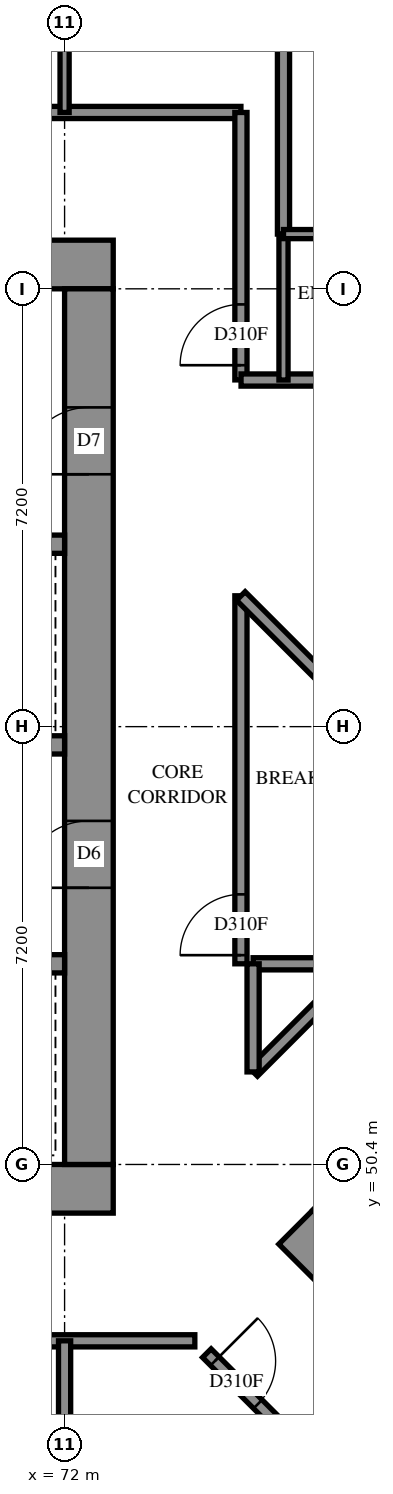
"""IFC4 building model, lengths in metres.
Left out: names, types, materials, properties, quantities, classifications, styles, units other than length and angle.
Written with IfcOpenShell. Run it as: python <this file> out.ifc"""

import sys

from ifc_helpers import new_model, si_unit, direction, frame, frame_2d, origin, place, context, subcontext, project, spatial, rectangle, extrude, element, fill, save


model = new_model("IFC4")
c1 = context("Model", 3, precision=1e-05, world=origin(), true_north=direction((0.0, 1.0)))
c2 = subcontext(c1, "Body", "Model", "MODEL_VIEW")
j1 = project(units=[si_unit("LENGTHUNIT", "METRE"), si_unit("PLANEANGLEUNIT", "RADIAN")], contexts=[c1])
p1 = place(None, origin())
s1 = spatial("IfcSite", under=j1, at=p1, CompositionType="ELEMENT")
p2 = place(p1, origin())
s2 = spatial("IfcBuilding", under=s1, at=p2, CompositionType="ELEMENT")
p3 = place(p2, frame((0.0, 0.0, 94.8)))
s3 = spatial("IfcBuildingStorey", under=s2, at=p3, CompositionType="ELEMENT", Elevation=94.8)
p4 = place(p3, frame((56.8, 50.0, -0.3), z_axis=(0.0, 0.0, 1.0), x_axis=(1.0, 0.0, 0.0)))
e1 = element("IfcWall", 1, at=p4, inside=s3, PredefinedType="SHEAR", context=c2, shape_type="SweptSolid", body=[
    extrude(rectangle(XDim=16.0, YDim=0.8, at=frame_2d((8.0, 0.0))), origin(), (0.0, 0.0, 1.0), 2.7),
])
p5 = place(p3, frame((56.8, 65.2, -0.3), z_axis=(0.0, 0.0, 1.0), x_axis=(1.0, 0.0, 0.0)))
e2 = element("IfcWall", 2, at=p5, inside=s3, PredefinedType="SHEAR", context=c2, shape_type="SweptSolid", body=[
    extrude(rectangle(XDim=16.0, YDim=0.8, at=frame_2d((8.0, 0.0))), origin(), (0.0, 0.0, 1.0), 2.7),
])
p6 = place(p5, frame((10.8, 0.0, 0.3)))
e3 = element("IfcOpeningElement", 3, at=p6, cuts=e2, PredefinedType="OPENING", context=c2, shape_type="SweptSolid", body=[
    extrude(rectangle(XDim=0.8, YDim=2.1, at=frame_2d((0.4, 1.05))), frame((0.0, 0.41, 0.0), z_axis=(0.0, -1.0, 0.0), x_axis=(1.0, 0.0, 0.0)), (0.0, 0.0, 1.0), 0.82),
])
p7 = place(p3, frame((72.4, 50.4, -0.3), z_axis=(0.0, 0.0, 1.0), x_axis=(0.0, 1.0, 0.0)))
e4 = element("IfcWall", 4, at=p7, inside=s3, PredefinedType="SHEAR", context=c2, shape_type="SweptSolid", body=[
    extrude(rectangle(XDim=14.4, YDim=0.8, at=frame_2d((7.2, 0.0))), origin(), (0.0, 0.0, 1.0), 2.7),
])
p8 = place(p7, frame((4.55, 0.0, 0.3)))
e5 = element("IfcOpeningElement", 5, at=p8, cuts=e4, PredefinedType="OPENING", context=c2, shape_type="SweptSolid", body=[
    extrude(rectangle(XDim=1.1, YDim=2.1, at=frame_2d((0.55, 1.05))), frame((0.0, 0.41, 0.0), z_axis=(0.0, -1.0, 0.0), x_axis=(1.0, 0.0, 0.0)), (0.0, 0.0, 1.0), 0.82),
])
p9 = place(p7, frame((11.35, 0.0, 0.3)))
e6 = element("IfcOpeningElement", 6, at=p9, cuts=e4, PredefinedType="OPENING", context=c2, shape_type="SweptSolid", body=[
    extrude(rectangle(XDim=1.1, YDim=2.1, at=frame_2d((0.55, 1.05))), frame((0.0, 0.41, 0.0), z_axis=(0.0, -1.0, 0.0), x_axis=(1.0, 0.0, 0.0)), (0.0, 0.0, 1.0), 0.82),
])
p10 = place(p3, frame((57.6, 53.7, 0.0), z_axis=(0.0, 0.0, 1.0), x_axis=(1.0, 0.0, 0.0)))
e7 = element("IfcWall", 7, at=p10, inside=s3, PredefinedType="SOLIDWALL", context=c2, shape_type="SweptSolid", body=[
    extrude(rectangle(XDim=14.4, YDim=0.3, at=frame_2d((7.2, 0.0))), origin(), (0.0, 0.0, 1.0), 3.1),
])
p11 = place(p10, frame((1.25, 0.0, 0.0)))
e8 = element("IfcOpeningElement", 8, at=p11, cuts=e7, PredefinedType="OPENING", context=c2, shape_type="SweptSolid", body=[
    extrude(rectangle(XDim=1.1, YDim=2.1, at=frame_2d((0.55, 1.05))), frame((0.0, 0.16, 0.0), z_axis=(0.0, -1.0, 0.0), x_axis=(1.0, 0.0, 0.0)), (0.0, 0.0, 1.0), 0.32),
])
p12 = place(p10, frame((4.85, 0.0, 0.0)))
e9 = element("IfcOpeningElement", 9, at=p12, cuts=e7, PredefinedType="OPENING", context=c2, shape_type="SweptSolid", body=[
    extrude(rectangle(XDim=1.1, YDim=2.1, at=frame_2d((0.55, 1.05))), frame((0.0, 0.16, 0.0), z_axis=(0.0, -1.0, 0.0), x_axis=(1.0, 0.0, 0.0)), (0.0, 0.0, 1.0), 0.32),
])
p13 = place(p10, frame((8.45, 0.0, 0.0)))
e10 = element("IfcOpeningElement", 10, at=p13, cuts=e7, PredefinedType="OPENING", context=c2, shape_type="SweptSolid", body=[
    extrude(rectangle(XDim=1.1, YDim=2.1, at=frame_2d((0.55, 1.05))), frame((0.0, 0.16, 0.0), z_axis=(0.0, -1.0, 0.0), x_axis=(1.0, 0.0, 0.0)), (0.0, 0.0, 1.0), 0.32),
])
p14 = place(p10, frame((12.05, 0.0, 0.0)))
e11 = element("IfcOpeningElement", 11, at=p14, cuts=e7, PredefinedType="OPENING", context=c2, shape_type="SweptSolid", body=[
    extrude(rectangle(XDim=1.1, YDim=2.1, at=frame_2d((0.55, 1.05))), frame((0.0, 0.16, 0.0), z_axis=(0.0, -1.0, 0.0), x_axis=(1.0, 0.0, 0.0)), (0.0, 0.0, 1.0), 0.32),
])
p15 = place(p3, frame((57.6, 57.3, 0.0), z_axis=(0.0, 0.0, 1.0), x_axis=(1.0, 0.0, 0.0)))
e12 = element("IfcWall", 12, at=p15, inside=s3, PredefinedType="SOLIDWALL", context=c2, shape_type="SweptSolid", body=[
    extrude(rectangle(XDim=14.4, YDim=0.3, at=frame_2d((7.2, 0.0))), origin(), (0.0, 0.0, 1.0), 3.1),
])
p16 = place(p15, frame((12.05, 0.0, 0.0)))
e13 = element("IfcOpeningElement", 13, at=p16, cuts=e12, PredefinedType="OPENING", context=c2, shape_type="SweptSolid", body=[
    extrude(rectangle(XDim=1.1, YDim=2.1, at=frame_2d((0.55, 1.05))), frame((0.0, 0.16, 0.0), z_axis=(0.0, -1.0, 0.0), x_axis=(1.0, 0.0, 0.0)), (0.0, 0.0, 1.0), 0.32),
])
p17 = place(p3, frame((64.8, 60.6, 0.0), z_axis=(0.0, 0.0, 1.0), x_axis=(1.0, 0.0, 0.0)))
e14 = element("IfcWall", 14, at=p17, inside=s3, PredefinedType="SOLIDWALL", context=c2, shape_type="SweptSolid", body=[
    extrude(rectangle(XDim=7.2, YDim=0.3, at=frame_2d((3.6, 0.0))), origin(), (0.0, 0.0, 1.0), 3.1),
])
p18 = place(p3, frame((75.806, 49.373, -0.3), z_axis=(0.0, 0.0, 1.0), x_axis=(0.7071067812, -0.7071067812, 0.0)))
e15 = element("IfcWall", 15, at=p18, inside=s3, PredefinedType="SHEAR", context=c2, shape_type="SweptSolid", body=[
    extrude(rectangle(XDim=16.0, YDim=0.8, at=frame_2d((8.0, 0.0))), origin(), (0.0, 0.0, 1.0), 2.7),
])
p19 = place(p3, frame((76.372, 49.373, -0.3), z_axis=(0.0, 0.0, 1.0), x_axis=(0.7071067812, 0.7071067812, 0.0)))
e16 = element("IfcWall", 16, at=p19, inside=s3, PredefinedType="SHEAR", context=c2, shape_type="SweptSolid", body=[
    extrude(rectangle(XDim=14.4, YDim=0.8, at=frame_2d((7.2, 0.0))), origin(), (0.0, 0.0, 1.0), 2.7),
])
p20 = place(p19, frame((4.55, 0.0, 0.3)))
e17 = element("IfcOpeningElement", 17, at=p20, cuts=e16, PredefinedType="OPENING", context=c2, shape_type="SweptSolid", body=[
    extrude(rectangle(XDim=1.1, YDim=2.1, at=frame_2d((0.55, 1.05))), frame((0.0, 0.41, 0.0), z_axis=(0.0, -1.0, 0.0), x_axis=(1.0, 0.0, 0.0)), (0.0, 0.0, 1.0), 0.82),
])
p21 = place(p19, frame((11.35, 0.0, 0.3)))
e18 = element("IfcOpeningElement", 18, at=p21, cuts=e16, PredefinedType="OPENING", context=c2, shape_type="SweptSolid", body=[
    extrude(rectangle(XDim=1.1, YDim=2.1, at=frame_2d((0.55, 1.05))), frame((0.0, 0.41, 0.0), z_axis=(0.0, -1.0, 0.0), x_axis=(1.0, 0.0, 0.0)), (0.0, 0.0, 1.0), 0.82),
])
p22 = place(p3, frame((54.7, 67.7, 0.0), z_axis=(0.0, 0.0, 1.0), x_axis=(1.0, 0.0, 0.0)))
e19 = element("IfcWall", 19, at=p22, inside=s3, PredefinedType="PARTITIONING", context=c2, shape_type="SweptSolid", body=[
    extrude(rectangle(XDim=20.2, YDim=0.2, at=frame_2d((10.1, 0.0))), origin(), (0.0, 0.0, 1.0), 3.1),
])
p23 = place(p22, frame((5.25, 0.0, 0.0)))
e20 = element("IfcOpeningElement", 20, at=p23, cuts=e19, PredefinedType="OPENING", context=c2, shape_type="SweptSolid", body=[
    extrude(rectangle(XDim=0.9, YDim=2.1, at=frame_2d((0.45, 1.05))), frame((0.0, 0.11, 0.0), z_axis=(0.0, -1.0, 0.0), x_axis=(1.0, 0.0, 0.0)), (0.0, 0.0, 1.0), 0.22),
])
p24 = place(p22, frame((6.9, 0.0, 0.0)))
e21 = element("IfcOpeningElement", 21, at=p24, cuts=e19, PredefinedType="OPENING", context=c2, shape_type="SweptSolid", body=[
    extrude(rectangle(XDim=0.9, YDim=2.1, at=frame_2d((0.45, 1.05))), frame((0.0, 0.11, 0.0), z_axis=(0.0, -1.0, 0.0), x_axis=(1.0, 0.0, 0.0)), (0.0, 0.0, 1.0), 0.22),
])
p25 = place(p22, frame((12.45, 0.0, 0.0)))
e22 = element("IfcOpeningElement", 22, at=p25, cuts=e19, PredefinedType="OPENING", context=c2, shape_type="SweptSolid", body=[
    extrude(rectangle(XDim=0.9, YDim=2.1, at=frame_2d((0.45, 1.05))), frame((0.0, 0.11, 0.0), z_axis=(0.0, -1.0, 0.0), x_axis=(1.0, 0.0, 0.0)), (0.0, 0.0, 1.0), 0.22),
])
p26 = place(p22, frame((14.1, 0.0, 0.0)))
e23 = element("IfcOpeningElement", 23, at=p26, cuts=e19, PredefinedType="OPENING", context=c2, shape_type="SweptSolid", body=[
    extrude(rectangle(XDim=0.9, YDim=2.1, at=frame_2d((0.45, 1.05))), frame((0.0, 0.11, 0.0), z_axis=(0.0, -1.0, 0.0), x_axis=(1.0, 0.0, 0.0)), (0.0, 0.0, 1.0), 0.22),
])
p27 = place(p3, frame((54.7, 47.5, 0.0), z_axis=(0.0, 0.0, 1.0), x_axis=(1.0, 0.0, 0.0)))
e24 = element("IfcWall", 24, at=p27, inside=s3, PredefinedType="PARTITIONING", context=c2, shape_type="SweptSolid", body=[
    extrude(rectangle(XDim=19.442, YDim=0.2, at=frame_2d((9.721, 0.0))), origin(), (0.0, 0.0, 1.0), 3.1),
])
p28 = place(p27, frame((5.2, 0.0, 0.0)))
e25 = element("IfcOpeningElement", 25, at=p28, cuts=e24, PredefinedType="OPENING", context=c2, shape_type="SweptSolid", body=[
    extrude(rectangle(XDim=0.9, YDim=2.1, at=frame_2d((0.45, 1.05))), frame((0.0, 0.11, 0.0), z_axis=(0.0, -1.0, 0.0), x_axis=(1.0, 0.0, 0.0)), (0.0, 0.0, 1.0), 0.22),
])
p29 = place(p27, frame((6.9, 0.0, 0.0)))
e26 = element("IfcOpeningElement", 26, at=p29, cuts=e24, PredefinedType="OPENING", context=c2, shape_type="SweptSolid", body=[
    extrude(rectangle(XDim=0.9, YDim=2.1, at=frame_2d((0.45, 1.05))), frame((0.0, 0.11, 0.0), z_axis=(0.0, -1.0, 0.0), x_axis=(1.0, 0.0, 0.0)), (0.0, 0.0, 1.0), 0.22),
])
p30 = place(p27, frame((13.963, 0.0, 0.0)))
e27 = element("IfcOpeningElement", 27, at=p30, cuts=e24, PredefinedType="OPENING", context=c2, shape_type="SweptSolid", body=[
    extrude(rectangle(XDim=1.0, YDim=2.1, at=frame_2d((0.5, 1.05))), frame((0.0, 0.11, 0.0), z_axis=(0.0, -1.0, 0.0), x_axis=(1.0, 0.0, 0.0)), (0.0, 0.0, 1.0), 0.22),
])
p31 = place(p3, frame((75.6, 65.7, 0.0), z_axis=(0.0, 0.0, 1.0), x_axis=(0.0, 1.0, 0.0)))
e28 = element("IfcWall", 28, at=p31, inside=s3, PredefinedType="PARTITIONING", context=c2, shape_type="SweptSolid", body=[
    extrude(rectangle(XDim=7.027, YDim=0.2, at=frame_2d((3.514, 0.0))), origin(), (0.0, 0.0, 1.0), 3.1),
])
p32 = place(p3, frame((74.9, 53.7, 0.0), z_axis=(0.0, 0.0, 1.0), x_axis=(0.0, 1.0, 0.0)))
e29 = element("IfcWall", 29, at=p32, inside=s3, PredefinedType="PARTITIONING", context=c2, shape_type="SweptSolid", body=[
    extrude(rectangle(XDim=6.052, YDim=0.2, at=frame_2d((3.026, 0.0))), origin(), (0.0, 0.0, 1.0), 3.1),
])
p33 = place(p32, frame((0.142, 0.0, 0.0)))
e30 = element("IfcOpeningElement", 30, at=p33, cuts=e29, PredefinedType="OPENING", context=c2, shape_type="SweptSolid", body=[
    extrude(rectangle(XDim=1.0, YDim=2.1, at=frame_2d((0.5, 1.05))), frame((0.0, 0.11, 0.0), z_axis=(0.0, -1.0, 0.0), x_axis=(1.0, 0.0, 0.0)), (0.0, 0.0, 1.0), 0.22),
])
p34 = place(p3, frame((74.9, 63.302, 0.0), z_axis=(0.0, 0.0, 1.0), x_axis=(0.0, 1.0, 0.0)))
e31 = element("IfcWall", 31, at=p34, inside=s3, PredefinedType="PARTITIONING", context=c2, shape_type="SweptSolid", body=[
    extrude(rectangle(XDim=4.398, YDim=0.2, at=frame_2d((2.199, 0.0))), origin(), (0.0, 0.0, 1.0), 3.1),
])
p35 = place(p34, frame((0.242, 0.0, 0.0)))
e32 = element("IfcOpeningElement", 32, at=p35, cuts=e31, PredefinedType="OPENING", context=c2, shape_type="SweptSolid", body=[
    extrude(rectangle(XDim=1.0, YDim=2.1, at=frame_2d((0.5, 1.05))), frame((0.0, 0.11, 0.0), z_axis=(0.0, -1.0, 0.0), x_axis=(1.0, 0.0, 0.0)), (0.0, 0.0, 1.0), 0.22),
])
p36 = place(p3, frame((74.902, 63.3, 0.0), z_axis=(0.0, 0.0, 1.0), x_axis=(1.0, 0.0, 0.0)))
e33 = element("IfcWall", 33, at=p36, inside=s3, PredefinedType="PARTITIONING", context=c2, shape_type="SweptSolid", body=[
    extrude(rectangle(XDim=4.298, YDim=0.2, at=frame_2d((2.149, 0.0))), origin(), (0.0, 0.0, 1.0), 3.1),
])
p37 = place(p36, frame((2.888, 0.0, 0.0)))
e34 = element("IfcOpeningElement", 34, at=p37, cuts=e33, PredefinedType="OPENING", context=c2, shape_type="SweptSolid", body=[
    extrude(rectangle(XDim=0.9, YDim=2.1, at=frame_2d((0.45, 1.05))), frame((0.0, 0.11, 0.0), z_axis=(0.0, -1.0, 0.0), x_axis=(1.0, 0.0, 0.0)), (0.0, 0.0, 1.0), 0.22),
])
p38 = place(p3, frame((72.0, 43.7, 0.0), z_axis=(0.0, 0.0, 1.0), x_axis=(0.0, 1.0, 0.0)))
e35 = element("IfcWall", 35, at=p38, inside=s3, PredefinedType="PARTITIONING", context=c2, shape_type="SweptSolid", body=[
    extrude(rectangle(XDim=3.8, YDim=0.2, at=frame_2d((1.9, 0.0))), origin(), (0.0, 0.0, 1.0), 3.1),
])
p39 = place(p3, frame((74.899, 59.749, 0.0), z_axis=(0.0, 0.0, 1.0), x_axis=(0.7071067812, -0.7071067812, 0.0)))
e36 = element("IfcWall", 36, at=p39, inside=s3, PredefinedType="PARTITIONING", context=c2, shape_type="SweptSolid", body=[
    extrude(rectangle(XDim=3.601, YDim=0.2, at=frame_2d((1.8, 0.0))), origin(), (0.0, 0.0, 1.0), 3.1),
])
p40 = place(p3, frame((75.102, 51.922, 0.0), z_axis=(0.0, 0.0, 1.0), x_axis=(0.7071067812, 0.7071067812, 0.0)))
e37 = element("IfcWall", 37, at=p40, inside=s3, PredefinedType="PARTITIONING", context=c2, shape_type="SweptSolid", body=[
    extrude(rectangle(XDim=2.514, YDim=0.2, at=frame_2d((1.257, 0.0))), origin(), (0.0, 0.0, 1.0), 3.1),
])
for number, where, z_axis, x_axis in (
    (38, (75.6, 63.3, 0.0), (0.0, 0.0, 1.0), (0.0, 1.0, 0.0)),
    (39, (72.0, 67.7, 0.0), (0.0, 0.0, 1.0), (0.0, 1.0, 0.0)),
):
    element("IfcWall", number, at=place(p3, frame(where, z_axis=z_axis, x_axis=x_axis)), inside=s3, PredefinedType="PARTITIONING", context=c2, shape_type="SweptSolid", body=[
        extrude(rectangle(XDim=2.4, YDim=0.15, at=frame_2d((1.2, 0.0))), origin(), (0.0, 0.0, 1.0), 3.1),
    ])
p41 = place(p3, frame((75.6, 65.7, 0.0), z_axis=(0.0, 0.0, 1.0), x_axis=(1.0, 0.0, 0.0)))
e40 = element("IfcWall", 40, at=p41, inside=s3, PredefinedType="PARTITIONING", context=c2, shape_type="SweptSolid", body=[
    extrude(rectangle(XDim=1.9, YDim=0.15, at=frame_2d((0.95, 0.0))), origin(), (0.0, 0.0, 1.0), 3.1),
])
p42 = place(p41, frame((0.607, 0.0, 0.0)))
e41 = element("IfcOpeningElement", 41, at=p42, cuts=e40, PredefinedType="OPENING", context=c2, shape_type="SweptSolid", body=[
    extrude(rectangle(XDim=0.8, YDim=2.1, at=frame_2d((0.4, 1.05))), frame((0.0, 0.085, 0.0), z_axis=(0.0, -1.0, 0.0), x_axis=(1.0, 0.0, 0.0)), (0.0, 0.0, 1.0), 0.17),
])
p43 = place(p3, frame((75.1, 53.7, 0.0), z_axis=(0.0, 0.0, 1.0), x_axis=(1.0, 0.0, 0.0)))
e42 = element("IfcWall", 42, at=p43, inside=s3, PredefinedType="PARTITIONING", context=c2, shape_type="SweptSolid", body=[
    extrude(rectangle(XDim=1.78, YDim=0.2, at=frame_2d((0.89, 0.0))), origin(), (0.0, 0.0, 1.0), 3.1),
])
p44 = place(p3, frame((74.339, 47.297, 0.0), z_axis=(0.0, 0.0, 1.0), x_axis=(0.7071067812, -0.7071067812, 0.0)))
e43 = element("IfcWall", 43, at=p44, inside=s3, PredefinedType="PARTITIONING", context=c2, shape_type="SweptSolid", body=[
    extrude(rectangle(XDim=1.779, YDim=0.2, at=frame_2d((0.889, 0.0))), origin(), (0.0, 0.0, 1.0), 3.1),
])
p45 = place(p44, frame((0.186, 0.0, 0.0)))
e44 = element("IfcOpeningElement", 44, at=p45, cuts=e43, PredefinedType="OPENING", context=c2, shape_type="SweptSolid", body=[
    extrude(rectangle(XDim=1.0, YDim=2.1, at=frame_2d((0.5, 1.05))), frame((0.0, 0.11, 0.0), z_axis=(0.0, -1.0, 0.0), x_axis=(1.0, 0.0, 0.0)), (0.0, 0.0, 1.0), 0.22),
])
p46 = place(p3, frame((75.1, 51.922, 0.0), z_axis=(0.0, 0.0, 1.0), x_axis=(0.0, 1.0, 0.0)))
e45 = element("IfcWall", 45, at=p46, inside=s3, PredefinedType="PARTITIONING", context=c2, shape_type="SweptSolid", body=[
    extrude(rectangle(XDim=1.778, YDim=0.2, at=frame_2d((0.889, 0.0))), origin(), (0.0, 0.0, 1.0), 3.1),
])
p47 = place(p8, origin())
e46 = element("IfcDoor", 46, at=p47, inside=s3, OperationType="DOUBLE_DOOR_SINGLE_SWING", PredefinedType="DOOR", context=c2, shape_type="SweptSolid", body=[
    extrude(rectangle(XDim=1.1, YDim=2.1, at=frame_2d((0.55, 1.05))), frame((0.0, 0.025, 0.0), z_axis=(0.0, -1.0, 0.0), x_axis=(1.0, 0.0, 0.0)), (0.0, 0.0, 1.0), 0.05),
])
fill(e5, e46)
p48 = place(p9, origin())
e47 = element("IfcDoor", 47, at=p48, inside=s3, OperationType="SINGLE_SWING_RIGHT", PredefinedType="DOOR", context=c2, shape_type="SweptSolid", body=[
    extrude(rectangle(XDim=1.1, YDim=2.1, at=frame_2d((0.55, 1.05))), frame((0.0, 0.025, 0.0), z_axis=(0.0, -1.0, 0.0), x_axis=(1.0, 0.0, 0.0)), (0.0, 0.0, 1.0), 0.05),
])
fill(e6, e47)
p49 = place(p33, origin())
e48 = element("IfcDoor", 48, at=p49, inside=s3, OperationType="SINGLE_SWING_LEFT", PredefinedType="DOOR", context=c2, shape_type="SweptSolid", body=[
    extrude(rectangle(XDim=1.0, YDim=2.1, at=frame_2d((0.5, 1.05))), frame((0.0, 0.025, 0.0), z_axis=(0.0, -1.0, 0.0), x_axis=(1.0, 0.0, 0.0)), (0.0, 0.0, 1.0), 0.05),
])
fill(e30, e48)
p50 = place(p35, origin())
e49 = element("IfcDoor", 49, at=p50, inside=s3, OperationType="SINGLE_SWING_RIGHT", PredefinedType="DOOR", context=c2, shape_type="SweptSolid", body=[
    extrude(rectangle(XDim=1.0, YDim=2.1, at=frame_2d((0.5, 1.05))), frame((0.0, 0.025, 0.0), z_axis=(0.0, -1.0, 0.0), x_axis=(1.0, 0.0, 0.0)), (0.0, 0.0, 1.0), 0.05),
])
fill(e32, e49)
p51 = place(p45, origin())
e50 = element("IfcDoor", 50, at=p51, inside=s3, OperationType="SINGLE_SWING_LEFT", PredefinedType="DOOR", context=c2, shape_type="SweptSolid", body=[
    extrude(rectangle(XDim=1.0, YDim=2.1, at=frame_2d((0.5, 1.05))), frame((0.0, 0.025, 0.0), z_axis=(0.0, -1.0, 0.0), x_axis=(1.0, 0.0, 0.0)), (0.0, 0.0, 1.0), 0.05),
])
fill(e44, e50)
save(model, sys.argv[1])
